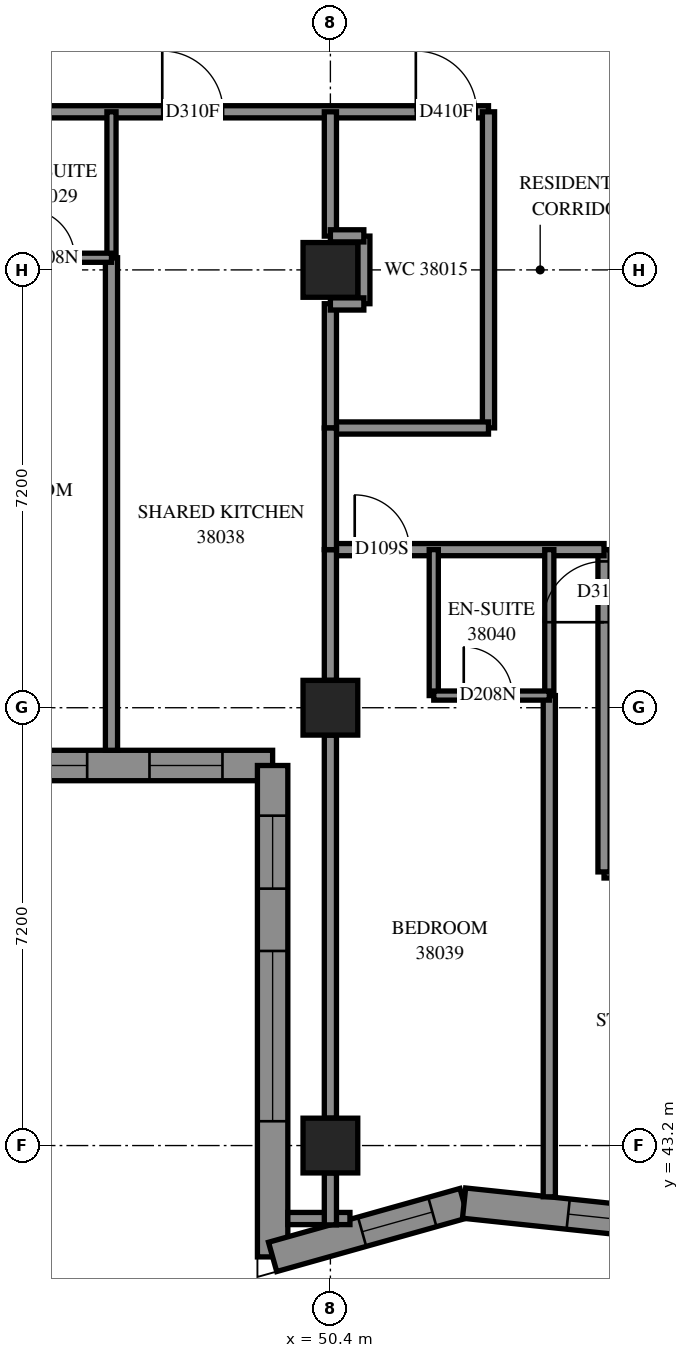
"""IFC4 building model, lengths in metres.
Left out: names, types, materials, properties, quantities, classifications, styles, units other than length and angle.
Written with IfcOpenShell. Run it as: python <this file> out.ifc"""

import sys

from ifc_helpers import new_model, si_unit, direction, frame, frame_2d, origin, origin_2d, place, context, subcontext, project, spatial, polyline, rectangle, outline, extrude, element, fill, save


model = new_model("IFC4")
c1 = context("Model", 3, precision=1e-05, world=origin(), true_north=direction((0.0, 1.0)))
c2 = subcontext(c1, "Body", "Model", "MODEL_VIEW")
j1 = project(units=[si_unit("LENGTHUNIT", "METRE"), si_unit("PLANEANGLEUNIT", "RADIAN")], contexts=[c1])
p1 = place(None, origin())
s1 = spatial("IfcSite", under=j1, at=p1, CompositionType="ELEMENT")
p2 = place(p1, origin())
s2 = spatial("IfcBuilding", under=s1, at=p2, CompositionType="ELEMENT")
p3 = place(p2, frame((0.0, 0.0, 142.2)))
s3 = spatial("IfcBuildingStorey", under=s2, at=p3, CompositionType="ELEMENT", Elevation=142.2)
for number, where, z_axis, x_axis in (
    (1, (50.4, 43.2, 0.0), (0.0, 0.0, 1.0), (1.0, 0.0, 0.0)),
    (2, (50.4, 50.4, 0.0), (0.0, 0.0, 1.0), (1.0, 0.0, 0.0)),
    (3, (50.4, 57.6, 0.0), (0.0, 0.0, 1.0), (1.0, 0.0, 0.0)),
):
    element("IfcColumn", number, at=place(p3, frame(where, z_axis=z_axis, x_axis=x_axis)), inside=s3, PredefinedType="COLUMN", context=c2, shape_type="SweptSolid", body=[
        extrude(rectangle(XDim=0.9, YDim=0.9, at=origin_2d()), origin(), (0.0, 0.0, 1.0), 3.1),
    ])
p4 = place(p3, frame((42.25, 49.45, 0.0), z_axis=(0.0, 0.0, 1.0), x_axis=(1.0, 0.0, 0.0)))
e4 = element("IfcWall", 4, at=p4, inside=s3, PredefinedType="SOLIDWALL", context=c2, shape_type="SweptSolid", body=[
    extrude(outline(polyline([(-0.25, -0.25), (6.95, -0.25), (7.45, 0.25), (0.25, 0.25), (-0.25, -0.25)])), origin(), (0.0, 0.0, 1.0), 3.1),
])
p5 = place(p4, frame((1.35, 0.0, 0.45)))
e5 = element("IfcOpeningElement", 5, at=p5, cuts=e4, PredefinedType="OPENING", context=c2, shape_type="SweptSolid", body=[
    extrude(rectangle(XDim=2.8, YDim=2.5, at=frame_2d((1.4, 1.25))), frame((0.0, 0.26, 0.0), z_axis=(0.0, -1.0, 0.0), x_axis=(1.0, 0.0, 0.0)), (0.0, 0.0, 1.0), 0.52),
])
p6 = place(p4, frame((5.175, 0.0, 0.45)))
e6 = element("IfcOpeningElement", 6, at=p6, cuts=e4, PredefinedType="OPENING", context=c2, shape_type="SweptSolid", body=[
    extrude(rectangle(XDim=1.2, YDim=2.5, at=frame_2d((0.6, 1.25))), frame((0.0, 0.26, 0.0), z_axis=(0.0, -1.0, 0.0), x_axis=(1.0, 0.0, 0.0)), (0.0, 0.0, 1.0), 0.52),
])
p7 = place(p3, frame((49.45, 49.45, 0.0), z_axis=(0.0, 0.0, 1.0), x_axis=(0.0, -1.0, 0.0)))
e7 = element("IfcWall", 7, at=p7, inside=s3, PredefinedType="SOLIDWALL", context=c2, shape_type="SweptSolid", body=[
    extrude(outline(polyline([(0.25, -0.25), (8.411, -0.25), (7.751, 0.25), (-0.25, 0.25), (0.25, -0.25)])), origin(), (0.0, 0.0, 1.0), 3.1),
])
p8 = place(p7, frame((3.05, 0.0, 0.45)))
e8 = element("IfcOpeningElement", 8, at=p8, cuts=e7, PredefinedType="OPENING", context=c2, shape_type="SweptSolid", body=[
    extrude(rectangle(XDim=2.8, YDim=2.5, at=frame_2d((1.4, 1.25))), frame((0.0, 0.26, 0.0), z_axis=(0.0, -1.0, 0.0), x_axis=(1.0, 0.0, 0.0)), (0.0, 0.0, 1.0), 0.52),
])
p9 = place(p7, frame((0.825, 0.0, 0.45)))
e9 = element("IfcOpeningElement", 9, at=p9, cuts=e7, PredefinedType="OPENING", context=c2, shape_type="SweptSolid", body=[
    extrude(rectangle(XDim=1.2, YDim=2.5, at=frame_2d((0.6, 1.25))), frame((0.0, 0.26, 0.0), z_axis=(0.0, -1.0, 0.0), x_axis=(1.0, 0.0, 0.0)), (0.0, 0.0, 1.0), 0.52),
])
p10 = place(p3, frame((49.45, 41.369, 0.0), z_axis=(0.0, 0.0, 1.0), x_axis=(0.9627034728, 0.2705587246, 0.0)))
e10 = element("IfcWall", 10, at=p10, inside=s3, PredefinedType="SOLIDWALL", context=c2, shape_type="SweptSolid", body=[
    extrude(outline(polyline([(-0.33, -0.25), (3.222, -0.25), (3.318, 0.25), (0.33, 0.25), (-0.33, -0.25)])), origin(), (0.0, 0.0, 1.0), 3.1),
])
p11 = place(p10, frame((1.528, 0.0, 0.45)))
e11 = element("IfcOpeningElement", 11, at=p11, cuts=e10, PredefinedType="OPENING", context=c2, shape_type="SweptSolid", body=[
    extrude(rectangle(XDim=1.2, YDim=2.5, at=frame_2d((0.6, 1.25))), frame((0.0, 0.26, 0.0), z_axis=(0.0, -1.0, 0.0), x_axis=(1.0, 0.0, 0.0)), (0.0, 0.0, 1.0), 0.52),
])
p12 = place(p3, frame((52.598, 42.254, 0.0), z_axis=(0.0, 0.0, 1.0), x_axis=(0.9944732608, -0.1049901591, 0.0)))
e12 = element("IfcWall", 12, at=p12, inside=s3, PredefinedType="SOLIDWALL", context=c2, shape_type="SweptSolid", body=[
    extrude(outline(polyline([(0.048, -0.25), (3.487, -0.25), (3.434, 0.25), (-0.048, 0.25), (0.048, -0.25)])), origin(), (0.0, 0.0, 1.0), 3.1),
])
p13 = place(p12, frame((1.722, 0.0, 0.45)))
e13 = element("IfcOpeningElement", 13, at=p13, cuts=e12, PredefinedType="OPENING", context=c2, shape_type="SweptSolid", body=[
    extrude(rectangle(XDim=1.2, YDim=2.5, at=frame_2d((0.6, 1.25))), frame((0.0, 0.26, 0.0), z_axis=(0.0, -1.0, 0.0), x_axis=(1.0, 0.0, 0.0)), (0.0, 0.0, 1.0), 0.52),
])
p14 = place(p3, frame((54.9, 47.7, 0.0), z_axis=(0.0, 0.0, 1.0), x_axis=(1.0, 0.0, 0.0)))
e14 = element("IfcWall", 14, at=p14, inside=s3, PredefinedType="PARTITIONING", context=c2, shape_type="SweptSolid", body=[
    extrude(rectangle(XDim=19.326, YDim=0.2, at=frame_2d((9.663, 0.0))), origin(), (0.0, 0.0, 1.0), 3.1),
])
p15 = place(p14, frame((5.0, 0.0, 0.0)))
e15 = element("IfcOpeningElement", 15, at=p15, cuts=e14, PredefinedType="OPENING", context=c2, shape_type="SweptSolid", body=[
    extrude(rectangle(XDim=0.9, YDim=2.1, at=frame_2d((0.45, 1.05))), frame((0.0, 0.11, 0.0), z_axis=(0.0, -1.0, 0.0), x_axis=(1.0, 0.0, 0.0)), (0.0, 0.0, 1.0), 0.22),
])
p16 = place(p14, frame((12.2, 0.0, 0.0)))
e16 = element("IfcOpeningElement", 16, at=p16, cuts=e14, PredefinedType="OPENING", context=c2, shape_type="SweptSolid", body=[
    extrude(rectangle(XDim=0.9, YDim=2.1, at=frame_2d((0.45, 1.05))), frame((0.0, 0.11, 0.0), z_axis=(0.0, -1.0, 0.0), x_axis=(1.0, 0.0, 0.0)), (0.0, 0.0, 1.0), 0.22),
])
p17 = place(p14, frame((6.7, 0.0, 0.0)))
e17 = element("IfcOpeningElement", 17, at=p17, cuts=e14, PredefinedType="OPENING", context=c2, shape_type="SweptSolid", body=[
    extrude(rectangle(XDim=0.9, YDim=2.1, at=frame_2d((0.45, 1.05))), frame((0.0, 0.11, 0.0), z_axis=(0.0, -1.0, 0.0), x_axis=(1.0, 0.0, 0.0)), (0.0, 0.0, 1.0), 0.22),
])
p18 = place(p14, frame((13.9, 0.0, 0.0)))
e18 = element("IfcOpeningElement", 18, at=p18, cuts=e14, PredefinedType="OPENING", context=c2, shape_type="SweptSolid", body=[
    extrude(rectangle(XDim=0.9, YDim=2.1, at=frame_2d((0.45, 1.05))), frame((0.0, 0.11, 0.0), z_axis=(0.0, -1.0, 0.0), x_axis=(1.0, 0.0, 0.0)), (0.0, 0.0, 1.0), 0.22),
])
p19 = place(p3, frame((36.0, 60.2, 0.0), z_axis=(0.0, 0.0, 1.0), x_axis=(1.0, 0.0, 0.0)))
e19 = element("IfcWall", 19, at=p19, inside=s3, PredefinedType="PARTITIONING", context=c2, shape_type="SweptSolid", body=[
    extrude(rectangle(XDim=17.0, YDim=0.2, at=frame_2d((8.5, 0.0))), origin(), (0.0, 0.0, 1.0), 3.1),
])
p20 = place(p19, frame((15.805, 0.0, 0.0)))
e20 = element("IfcOpeningElement", 20, at=p20, cuts=e19, PredefinedType="OPENING", context=c2, shape_type="SweptSolid", body=[
    extrude(rectangle(XDim=1.0, YDim=2.1, at=frame_2d((0.5, 1.05))), frame((0.0, 0.11, 0.0), z_axis=(0.0, -1.0, 0.0), x_axis=(1.0, 0.0, 0.0)), (0.0, 0.0, 1.0), 0.22),
])
p21 = place(p19, frame((4.125, 0.0, 0.0)))
e21 = element("IfcOpeningElement", 21, at=p21, cuts=e19, PredefinedType="OPENING", context=c2, shape_type="SweptSolid", body=[
    extrude(rectangle(XDim=1.0, YDim=2.1, at=frame_2d((0.5, 1.05))), frame((0.0, 0.11, 0.0), z_axis=(0.0, -1.0, 0.0), x_axis=(1.0, 0.0, 0.0)), (0.0, 0.0, 1.0), 0.22),
])
p22 = place(p19, frame((7.55, 0.0, 0.0)))
e22 = element("IfcOpeningElement", 22, at=p22, cuts=e19, PredefinedType="OPENING", context=c2, shape_type="SweptSolid", body=[
    extrude(rectangle(XDim=0.9, YDim=2.1, at=frame_2d((0.45, 1.05))), frame((0.0, 0.11, 0.0), z_axis=(0.0, -1.0, 0.0), x_axis=(1.0, 0.0, 0.0)), (0.0, 0.0, 1.0), 0.22),
])
p23 = place(p19, frame((11.635, 0.0, 0.0)))
e23 = element("IfcOpeningElement", 23, at=p23, cuts=e19, PredefinedType="OPENING", context=c2, shape_type="SweptSolid", body=[
    extrude(rectangle(XDim=1.0, YDim=2.1, at=frame_2d((0.5, 1.05))), frame((0.0, 0.11, 0.0), z_axis=(0.0, -1.0, 0.0), x_axis=(1.0, 0.0, 0.0)), (0.0, 0.0, 1.0), 0.22),
])
p24 = place(p3, frame((54.0, 42.357, 0.0), z_axis=(0.0, 0.0, 1.0), x_axis=(0.0, 1.0, 0.0)))
e24 = element("IfcWall", 24, at=p24, inside=s3, PredefinedType="PARTITIONING", context=c2, shape_type="SweptSolid", body=[
    extrude(rectangle(XDim=8.243, YDim=0.2, at=frame_2d((4.122, 0.0))), origin(), (0.0, 0.0, 1.0), 3.1),
])
p25 = place(p3, frame((46.8, 49.7, 0.0), z_axis=(0.0, 0.0, 1.0), x_axis=(0.0, 1.0, 0.0)))
e25 = element("IfcWall", 25, at=p25, inside=s3, PredefinedType="PARTITIONING", context=c2, shape_type="SweptSolid", body=[
    extrude(rectangle(XDim=8.1, YDim=0.2, at=frame_2d((4.05, 0.0))), origin(), (0.0, 0.0, 1.0), 3.1),
])
p26 = place(p3, frame((50.4, 43.65, 0.0), z_axis=(0.0, 0.0, 1.0), x_axis=(0.0, 1.0, 0.0)))
e26 = element("IfcWall", 26, at=p26, inside=s3, PredefinedType="PARTITIONING", context=c2, shape_type="SweptSolid", body=[
    extrude(rectangle(XDim=6.3, YDim=0.2, at=frame_2d((3.15, 0.0))), origin(), (0.0, 0.0, 1.0), 2.6),
])
p27 = place(p3, frame((54.9, 47.7, 0.0), z_axis=(0.0, 0.0, 1.0), x_axis=(0.0, 1.0, 0.0)))
e27 = element("IfcWall", 27, at=p27, inside=s3, PredefinedType="PARTITIONING", context=c2, shape_type="SweptSolid", body=[
    extrude(rectangle(XDim=5.3, YDim=0.2, at=frame_2d((2.65, 0.0))), origin(), (0.0, 0.0, 1.0), 3.1),
])
p28 = place(p27, frame((4.106, 0.0, 0.0)))
e28 = element("IfcOpeningElement", 28, at=p28, cuts=e27, PredefinedType="OPENING", context=c2, shape_type="SweptSolid", body=[
    extrude(rectangle(XDim=1.0, YDim=2.1, at=frame_2d((0.5, 1.05))), frame((0.0, 0.11, 0.0), z_axis=(0.0, -1.0, 0.0), x_axis=(1.0, 0.0, 0.0)), (0.0, 0.0, 1.0), 0.22),
])
p29 = place(p3, frame((53.0, 55.002, 0.0), z_axis=(0.0, 0.0, 1.0), x_axis=(0.0, 1.0, 0.0)))
e29 = element("IfcWall", 29, at=p29, inside=s3, PredefinedType="PARTITIONING", context=c2, shape_type="SweptSolid", body=[
    extrude(rectangle(XDim=5.198, YDim=0.2, at=frame_2d((2.599, 0.0))), origin(), (0.0, 0.0, 1.0), 3.1),
])
p30 = place(p3, frame((50.4, 53.0, 0.0), z_axis=(0.0, 0.0, 1.0), x_axis=(1.0, 0.0, 0.0)))
e30 = element("IfcWall", 30, at=p30, inside=s3, PredefinedType="PARTITIONING", context=c2, shape_type="SweptSolid", body=[
    extrude(rectangle(XDim=4.5, YDim=0.2, at=frame_2d((2.25, 0.0))), origin(), (0.0, 0.0, 1.0), 3.1),
])
p31 = place(p30, frame((0.4, 0.0, 0.0)))
e31 = element("IfcOpeningElement", 31, at=p31, cuts=e30, PredefinedType="OPENING", context=c2, shape_type="SweptSolid", body=[
    extrude(rectangle(XDim=0.9, YDim=2.1, at=frame_2d((0.45, 1.05))), frame((0.0, 0.11, 0.0), z_axis=(0.0, -1.0, 0.0), x_axis=(1.0, 0.0, 0.0)), (0.0, 0.0, 1.0), 0.22),
])
p32 = place(p3, frame((50.4, 55.0, 0.0), z_axis=(0.0, 0.0, 1.0), x_axis=(1.0, 0.0, 0.0)))
e32 = element("IfcWall", 32, at=p32, inside=s3, PredefinedType="PARTITIONING", context=c2, shape_type="SweptSolid", body=[
    extrude(rectangle(XDim=2.6, YDim=0.2, at=frame_2d((1.3, 0.0))), origin(), (0.0, 0.0, 1.0), 3.1),
])
for number, where, z_axis, x_axis in (
    (33, (46.8, 57.8, 0.0), (0.0, 0.0, 1.0), (0.0, 1.0, 0.0)),
    (34, (52.1, 50.6, 0.0), (0.0, 0.0, 1.0), (0.0, 1.0, 0.0)),
    (35, (54.0, 50.6, 0.0), (0.0, 0.0, 1.0), (0.0, 1.0, 0.0)),
):
    element("IfcWall", number, at=place(p3, frame(where, z_axis=z_axis, x_axis=x_axis)), inside=s3, PredefinedType="PARTITIONING", context=c2, shape_type="SweptSolid", body=[
        extrude(rectangle(XDim=2.4, YDim=0.15, at=frame_2d((1.2, 0.0))), origin(), (0.0, 0.0, 1.0), 3.1),
    ])
p33 = place(p3, frame((50.4, 50.85, 0.0), z_axis=(0.0, 0.0, 1.0), x_axis=(0.0, 1.0, 0.0)))
e36 = element("IfcWall", 36, at=p33, inside=s3, PredefinedType="PARTITIONING", context=c2, shape_type="SweptSolid", body=[
    extrude(rectangle(XDim=2.15, YDim=0.2, at=frame_2d((1.075, 0.0))), origin(), (0.0, 0.0, 1.0), 3.1),
])
for number, where, z_axis, x_axis in (
    (37, (50.4, 58.156, 0.0), (0.0, 0.0, 1.0), (0.0, 1.0, 0.0)),
    (38, (50.4, 55.0, 0.0), (0.0, 0.0, 1.0), (0.0, 1.0, 0.0)),
):
    element("IfcWall", number, at=place(p3, frame(where, z_axis=z_axis, x_axis=x_axis)), inside=s3, PredefinedType="PARTITIONING", context=c2, shape_type="SweptSolid", body=[
        extrude(rectangle(XDim=2.044, YDim=0.2, at=frame_2d((1.022, 0.0))), origin(), (0.0, 0.0, 1.0), 3.1),
    ])
p34 = place(p3, frame((50.4, 53.0, 0.0), z_axis=(0.0, 0.0, 1.0), x_axis=(0.0, 1.0, 0.0)))
e39 = element("IfcWall", 39, at=p34, inside=s3, PredefinedType="PARTITIONING", context=c2, shape_type="SweptSolid", body=[
    extrude(rectangle(XDim=2.0, YDim=0.2, at=frame_2d((1.0, 0.0))), origin(), (0.0, 0.0, 1.0), 3.1),
])
p35 = place(p3, frame((44.9, 57.8, 0.0), z_axis=(0.0, 0.0, 1.0), x_axis=(1.0, 0.0, 0.0)))
e40 = element("IfcWall", 40, at=p35, inside=s3, PredefinedType="PARTITIONING", context=c2, shape_type="SweptSolid", body=[
    extrude(rectangle(XDim=1.9, YDim=0.15, at=frame_2d((0.95, 0.0))), origin(), (0.0, 0.0, 1.0), 3.1),
])
p36 = place(p35, frame((0.493, 0.0, 0.0)))
e41 = element("IfcOpeningElement", 41, at=p36, cuts=e40, PredefinedType="OPENING", context=c2, shape_type="SweptSolid", body=[
    extrude(rectangle(XDim=0.8, YDim=2.1, at=frame_2d((0.4, 1.05))), frame((0.0, 0.085, 0.0), z_axis=(0.0, -1.0, 0.0), x_axis=(1.0, 0.0, 0.0)), (0.0, 0.0, 1.0), 0.17),
])
p37 = place(p3, frame((52.1, 50.6, 0.0), z_axis=(0.0, 0.0, 1.0), x_axis=(1.0, 0.0, 0.0)))
e42 = element("IfcWall", 42, at=p37, inside=s3, PredefinedType="PARTITIONING", context=c2, shape_type="SweptSolid", body=[
    extrude(rectangle(XDim=1.9, YDim=0.15, at=frame_2d((0.95, 0.0))), origin(), (0.0, 0.0, 1.0), 3.1),
])
p38 = place(p37, frame((0.493, 0.0, 0.0)))
e43 = element("IfcOpeningElement", 43, at=p38, cuts=e42, PredefinedType="OPENING", context=c2, shape_type="SweptSolid", body=[
    extrude(rectangle(XDim=0.8, YDim=2.1, at=frame_2d((0.4, 1.05))), frame((0.0, 0.085, 0.0), z_axis=(0.0, -1.0, 0.0), x_axis=(1.0, 0.0, 0.0)), (0.0, 0.0, 1.0), 0.17),
])
p39 = place(p3, frame((50.95, 57.044, 0.0), z_axis=(0.0, 0.0, 1.0), x_axis=(0.0, 1.0, 0.0)))
e44 = element("IfcWall", 44, at=p39, inside=s3, PredefinedType="PARTITIONING", context=c2, shape_type="SweptSolid", body=[
    extrude(rectangle(XDim=1.112, YDim=0.2, at=frame_2d((0.556, 0.0))), origin(), (0.0, 0.0, 1.0), 3.1),
])
p40 = place(p3, frame((49.7, 42.0, 0.0), z_axis=(0.0, 0.0, 1.0), x_axis=(1.0, 0.0, 0.0)))
e45 = element("IfcWall", 45, at=p40, inside=s3, PredefinedType="PARTITIONING", context=c2, shape_type="SweptSolid", body=[
    extrude(rectangle(XDim=1.022, YDim=0.2, at=frame_2d((0.511, 0.0))), origin(), (0.0, 0.0, 1.0), 3.1),
])
p41 = place(p3, frame((50.4, 41.896, 0.0), z_axis=(0.0, 0.0, 1.0), x_axis=(0.0, 1.0, 0.0)))
e46 = element("IfcWall", 46, at=p41, inside=s3, PredefinedType="PARTITIONING", context=c2, shape_type="SweptSolid", body=[
    extrude(rectangle(XDim=0.854, YDim=0.2, at=frame_2d((0.427, 0.0))), origin(), (0.0, 0.0, 1.0), 3.1),
])
for number, where, z_axis, x_axis in (
    (47, (50.4, 57.04, 0.0), (0.0, 0.0, 1.0), (1.0, 0.0, 0.0)),
    (48, (50.4, 58.16, 0.0), (0.0, 0.0, 1.0), (1.0, 0.0, 0.0)),
):
    element("IfcWall", number, at=place(p3, frame(where, z_axis=z_axis, x_axis=x_axis)), inside=s3, PredefinedType="PARTITIONING", context=c2, shape_type="SweptSolid", body=[
        extrude(rectangle(XDim=0.55, YDim=0.2, at=frame_2d((0.275, 0.0))), origin(), (0.0, 0.0, 1.0), 3.1),
    ])
p42 = place(p5, origin())
e49 = element("IfcWindow", 49, at=p42, inside=s3, PartitioningType="SINGLE_PANEL", PredefinedType="WINDOW", context=c2, shape_type="SweptSolid", body=[
    extrude(rectangle(XDim=2.8, YDim=2.5, at=frame_2d((1.4, 1.25))), frame((0.0, 0.18, 0.0), z_axis=(0.0, -1.0, 0.0), x_axis=(1.0, 0.0, 0.0)), (0.0, 0.0, 1.0), 0.06),
])
fill(e5, e49)
p43 = place(p6, origin())
e50 = element("IfcWindow", 50, at=p43, inside=s3, PartitioningType="SINGLE_PANEL", PredefinedType="WINDOW", context=c2, shape_type="SweptSolid", body=[
    extrude(rectangle(XDim=1.2, YDim=2.5, at=frame_2d((0.6, 1.25))), frame((0.0, 0.18, 0.0), z_axis=(0.0, -1.0, 0.0), x_axis=(1.0, 0.0, 0.0)), (0.0, 0.0, 1.0), 0.06),
])
fill(e6, e50)
p44 = place(p8, origin())
e51 = element("IfcWindow", 51, at=p44, inside=s3, PartitioningType="SINGLE_PANEL", PredefinedType="WINDOW", context=c2, shape_type="SweptSolid", body=[
    extrude(rectangle(XDim=2.8, YDim=2.5, at=frame_2d((1.4, 1.25))), frame((0.0, 0.18, 0.0), z_axis=(0.0, -1.0, 0.0), x_axis=(1.0, 0.0, 0.0)), (0.0, 0.0, 1.0), 0.06),
])
fill(e8, e51)
p45 = place(p9, origin())
e52 = element("IfcWindow", 52, at=p45, inside=s3, PartitioningType="SINGLE_PANEL", PredefinedType="WINDOW", context=c2, shape_type="SweptSolid", body=[
    extrude(rectangle(XDim=1.2, YDim=2.5, at=frame_2d((0.6, 1.25))), frame((0.0, 0.18, 0.0), z_axis=(0.0, -1.0, 0.0), x_axis=(1.0, 0.0, 0.0)), (0.0, 0.0, 1.0), 0.06),
])
fill(e9, e52)
p46 = place(p11, origin())
e53 = element("IfcWindow", 53, at=p46, inside=s3, PartitioningType="SINGLE_PANEL", PredefinedType="WINDOW", context=c2, shape_type="SweptSolid", body=[
    extrude(rectangle(XDim=1.2, YDim=2.5, at=frame_2d((0.6, 1.25))), frame((0.0, 0.18, 0.0), z_axis=(0.0, -1.0, 0.0), x_axis=(1.0, 0.0, 0.0)), (0.0, 0.0, 1.0), 0.06),
])
fill(e11, e53)
p47 = place(p13, origin())
e54 = element("IfcWindow", 54, at=p47, inside=s3, PartitioningType="SINGLE_PANEL", PredefinedType="WINDOW", context=c2, shape_type="SweptSolid", body=[
    extrude(rectangle(XDim=1.2, YDim=2.5, at=frame_2d((0.6, 1.25))), frame((0.0, 0.18, 0.0), z_axis=(0.0, -1.0, 0.0), x_axis=(1.0, 0.0, 0.0)), (0.0, 0.0, 1.0), 0.06),
])
fill(e13, e54)
p48 = place(p20, origin())
e55 = element("IfcDoor", 55, at=p48, inside=s3, OperationType="SINGLE_SWING_LEFT", PredefinedType="DOOR", context=c2, shape_type="SweptSolid", body=[
    extrude(rectangle(XDim=1.0, YDim=2.1, at=frame_2d((0.5, 1.05))), frame((0.0, 0.025, 0.0), z_axis=(0.0, -1.0, 0.0), x_axis=(1.0, 0.0, 0.0)), (0.0, 0.0, 1.0), 0.05),
])
fill(e20, e55)
p49 = place(p36, origin())
e56 = element("IfcDoor", 56, at=p49, inside=s3, OperationType="SINGLE_SWING_RIGHT", PredefinedType="DOOR", context=c2, shape_type="SweptSolid", body=[
    extrude(rectangle(XDim=0.8, YDim=2.1, at=frame_2d((0.4, 1.05))), frame((0.0, 0.025, 0.0), z_axis=(0.0, -1.0, 0.0), x_axis=(1.0, 0.0, 0.0)), (0.0, 0.0, 1.0), 0.05),
])
fill(e41, e56)
p50 = place(p23, origin())
e57 = element("IfcDoor", 57, at=p50, inside=s3, OperationType="SINGLE_SWING_RIGHT", PredefinedType="DOOR", context=c2, shape_type="SweptSolid", body=[
    extrude(rectangle(XDim=1.0, YDim=2.1, at=frame_2d((0.5, 1.05))), frame((0.0, 0.025, 0.0), z_axis=(0.0, -1.0, 0.0), x_axis=(1.0, 0.0, 0.0)), (0.0, 0.0, 1.0), 0.05),
])
fill(e23, e57)
p51 = place(p31, origin())
e58 = element("IfcDoor", 58, at=p51, inside=s3, OperationType="SINGLE_SWING_LEFT", PredefinedType="DOOR", context=c2, shape_type="SweptSolid", body=[
    extrude(rectangle(XDim=0.9, YDim=2.1, at=frame_2d((0.45, 1.05))), frame((0.0, 0.025, 0.0), z_axis=(0.0, -1.0, 0.0), x_axis=(1.0, 0.0, 0.0)), (0.0, 0.0, 1.0), 0.05),
])
fill(e31, e58)
p52 = place(p38, origin())
e59 = element("IfcDoor", 59, at=p52, inside=s3, OperationType="SINGLE_SWING_RIGHT", PredefinedType="DOOR", context=c2, shape_type="SweptSolid", body=[
    extrude(rectangle(XDim=0.8, YDim=2.1, at=frame_2d((0.4, 1.05))), frame((0.0, 0.025, 0.0), z_axis=(0.0, -1.0, 0.0), x_axis=(1.0, 0.0, 0.0)), (0.0, 0.0, 1.0), 0.05),
])
fill(e43, e59)
p53 = place(p28, origin())
e60 = element("IfcDoor", 60, at=p53, inside=s3, OperationType="SINGLE_SWING_RIGHT", PredefinedType="DOOR", context=c2, shape_type="SweptSolid", body=[
    extrude(rectangle(XDim=1.0, YDim=2.1, at=frame_2d((0.5, 1.05))), frame((0.0, 0.025, 0.0), z_axis=(0.0, -1.0, 0.0), x_axis=(1.0, 0.0, 0.0)), (0.0, 0.0, 1.0), 0.05),
])
fill(e28, e60)
save(model, sys.argv[1])
